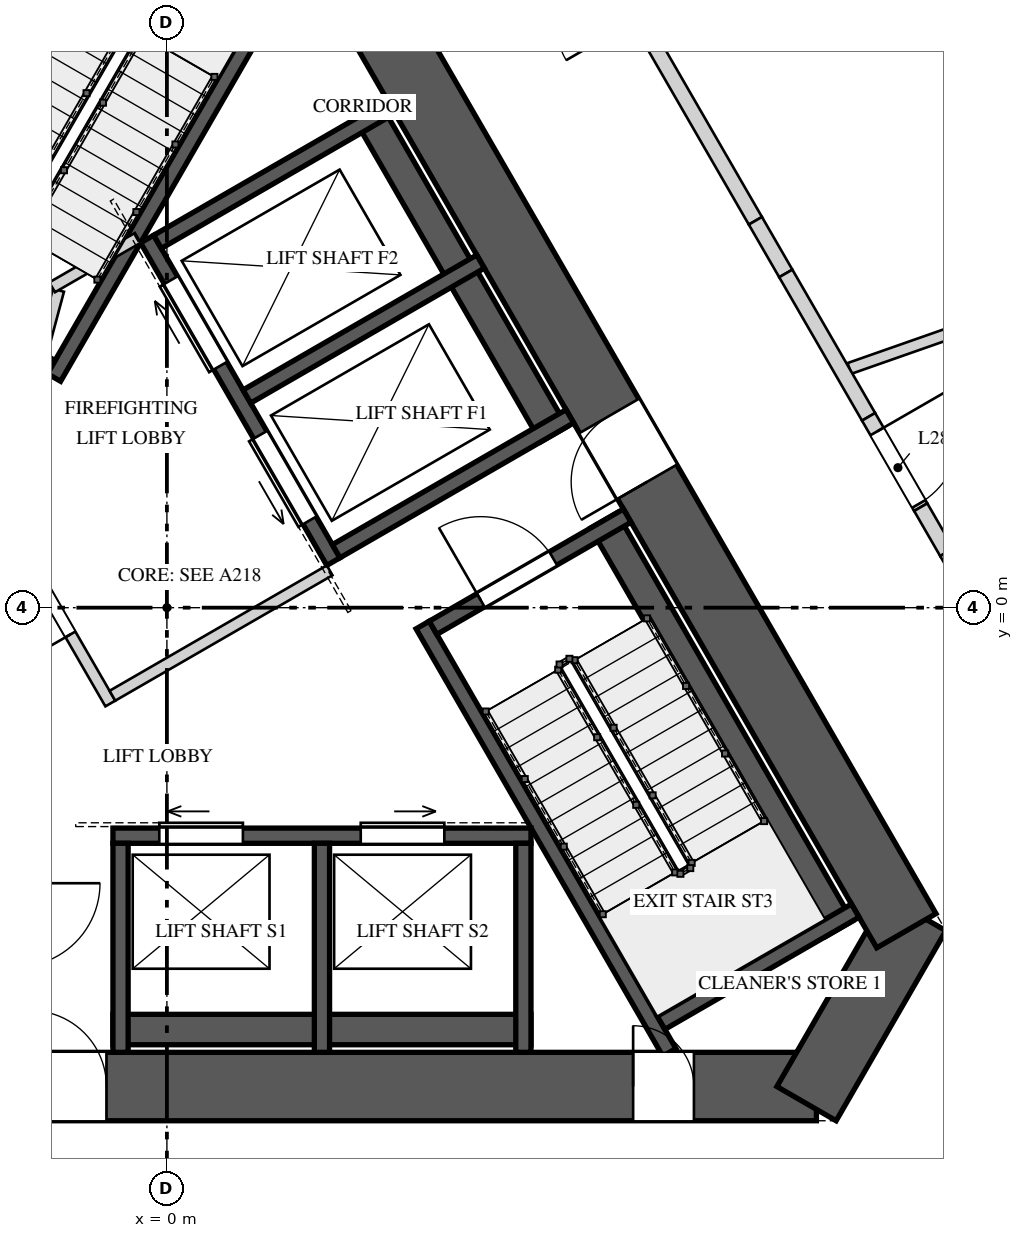
"""IFC4 building model, lengths in metres.
Left out: names, types, materials, properties, quantities, classifications, styles, units other than length and angle.
Written with IfcOpenShell. Run it as: python <this file> out.ifc"""

import sys

from ifc_helpers import new_model, si_unit, direction, frame, frame_2d, origin, place, context, subcontext, project, spatial, polyline, rectangle, outline, extrude, element, fill, save


model = new_model("IFC4")
c1 = context("Model", 3, precision=1e-05, world=origin(), true_north=direction((0.0, 1.0)))
c2 = subcontext(c1, "Body", "Model", "MODEL_VIEW")
j1 = project(units=[si_unit("LENGTHUNIT", "METRE"), si_unit("PLANEANGLEUNIT", "RADIAN")], contexts=[c1])
p1 = place(None, origin())
s1 = spatial("IfcSite", under=j1, at=p1, CompositionType="ELEMENT")
p2 = place(p1, origin())
s2 = spatial("IfcBuilding", under=s1, at=p2, CompositionType="ELEMENT")
p3 = place(p2, frame((0.0, 0.0, 125.6)))
s3 = spatial("IfcBuildingStorey", under=s2, at=p3, CompositionType="ELEMENT", Elevation=125.6)
p4 = place(p3, frame((-1.184, 10.55, 0.0), z_axis=(0.0, 0.0, 1.0), x_axis=(-0.500004814304, -0.866022624227, 0.0)))
e1 = element("IfcWall", 1, at=p4, inside=s3, PredefinedType="SHEAR", context=c2, shape_type="SweptSolid", body=[
    extrude(rectangle(XDim=17.09, YDim=0.9, at=frame_2d((8.545, 0.0))), origin(), (0.0, 0.0, 1.0), 4.0),
])
p5 = place(p4, frame((6.75, 0.0, 0.0)))
e2 = element("IfcOpeningElement", 2, at=p5, cuts=e1, PredefinedType="OPENING", context=c2, shape_type="SweptSolid", body=[
    extrude(rectangle(XDim=1.0, YDim=2.4, at=frame_2d((0.5, 1.2))), frame((0.0, 0.46, 0.0), z_axis=(0.0, -1.0, 0.0), x_axis=(1.0, 0.0, 0.0)), (0.0, 0.0, 1.0), 0.92),
])
p6 = place(p4, frame((14.678, 0.0, 0.0)))
e3 = element("IfcOpeningElement", 3, at=p6, cuts=e1, PredefinedType="OPENING", context=c2, shape_type="SweptSolid", body=[
    extrude(rectangle(XDim=0.8, YDim=2.1, at=frame_2d((0.4, 1.05))), frame((0.0, 0.46, 0.0), z_axis=(0.0, -1.0, 0.0), x_axis=(1.0, 0.0, 0.0)), (0.0, 0.0, 1.0), 0.92),
])
p7 = place(p3, frame((-8.545, -6.3, 0.0), z_axis=(0.0, 0.0, 1.0), x_axis=(1.0, 0.0, 0.0)))
e4 = element("IfcWall", 4, at=p7, inside=s3, PredefinedType="SHEAR", context=c2, shape_type="SweptSolid", body=[
    extrude(rectangle(XDim=17.09, YDim=0.9, at=frame_2d((8.545, 0.0))), origin(), (0.0, 0.0, 1.0), 4.0),
])
p8 = place(p7, frame((6.75, 0.0, 0.0)))
e5 = element("IfcOpeningElement", 5, at=p8, cuts=e4, PredefinedType="OPENING", context=c2, shape_type="SweptSolid", body=[
    extrude(rectangle(XDim=1.0, YDim=2.4, at=frame_2d((0.5, 1.2))), frame((0.0, 0.46, 0.0), z_axis=(0.0, -1.0, 0.0), x_axis=(1.0, 0.0, 0.0)), (0.0, 0.0, 1.0), 0.92),
])
p9 = place(p7, frame((14.678, 0.0, 0.0)))
e6 = element("IfcOpeningElement", 6, at=p9, cuts=e4, PredefinedType="OPENING", context=c2, shape_type="SweptSolid", body=[
    extrude(rectangle(XDim=0.8, YDim=2.1, at=frame_2d((0.4, 1.05))), frame((0.0, 0.46, 0.0), z_axis=(0.0, -1.0, 0.0), x_axis=(1.0, 0.0, 0.0)), (0.0, 0.0, 1.0), 0.92),
])
p10 = place(p3, frame((8.415, -6.525, 0.0), z_axis=(0.0, 0.0, 1.0), x_axis=(0.500059191753, 0.865991226713, 0.0)))
e7 = element("IfcWall", 7, at=p10, inside=s3, PredefinedType="SHEAR", context=c2, shape_type="SweptSolid", body=[
    extrude(rectangle(XDim=2.887, YDim=0.9, at=frame_2d((1.443, 0.0))), origin(), (0.0, 0.0, 1.0), 4.0),
])
p11 = place(p3, frame((9.729, -4.25, 0.0), z_axis=(0.0, 0.0, 1.0), x_axis=(-0.500004814304, 0.866022624227, 0.0)))
e8 = element("IfcWall", 8, at=p11, inside=s3, PredefinedType="SHEAR", context=c2, shape_type="SweptSolid", body=[
    extrude(rectangle(XDim=17.09, YDim=0.9, at=frame_2d((8.545, 0.0))), origin(), (0.0, 0.0, 1.0), 4.0),
])
p12 = place(p11, frame((6.82, 0.0, 0.0)))
e9 = element("IfcOpeningElement", 9, at=p12, cuts=e8, PredefinedType="OPENING", context=c2, shape_type="SweptSolid", body=[
    extrude(rectangle(XDim=1.0, YDim=2.4, at=frame_2d((0.5, 1.2))), frame((0.0, 0.46, 0.0), z_axis=(0.0, -1.0, 0.0), x_axis=(1.0, 0.0, 0.0)), (0.0, 0.0, 1.0), 0.92),
])
p13 = place(p3, frame((-0.766, 9.772, 0.0), z_axis=(0.0, 0.0, 1.0), x_axis=(-0.500009909098, -0.866019682689, 0.0)))
e10 = element("IfcWall", 10, at=p13, inside=s3, PredefinedType="SOLIDWALL", context=c2, shape_type="SweptSolid", body=[
    extrude(rectangle(XDim=6.2, YDim=0.4, at=frame_2d((3.1, 0.0))), origin(), (0.0, 0.0, 1.0), 3.65),
])
p14 = place(p3, frame((1.761, 8.65, 0.0), z_axis=(0.0, 0.0, 1.0), x_axis=(-0.500010023241, -0.866019616786, 0.0)))
e11 = element("IfcWall", 11, at=p14, inside=s3, PredefinedType="SOLIDWALL", context=c2, shape_type="SweptSolid", body=[
    extrude(rectangle(XDim=6.491, YDim=0.2, at=frame_2d((3.246, 0.0))), origin(), (0.0, 0.0, 1.0), 3.65),
])
p15 = place(p3, frame((-1.521, 3.165, 0.0), z_axis=(0.0, 0.0, 1.0), x_axis=(-0.866039495442, 0.49997559174, 0.0)))
e12 = element("IfcWall", 12, at=p15, inside=s3, PredefinedType="SOLIDWALL", context=c2, shape_type="SweptSolid", body=[
    extrude(rectangle(XDim=2.95, YDim=0.2, at=frame_2d((1.475, 0.0))), origin(), (0.0, 0.0, 1.0), 3.65),
])
p16 = place(p15, frame((0.725, 0.0, 0.0)))
e13 = element("IfcOpeningElement", 13, at=p16, cuts=e12, PredefinedType="OPENING", context=c2, shape_type="SweptSolid", body=[
    extrude(rectangle(XDim=1.1, YDim=2.4, at=frame_2d((0.55, 1.2))), frame((0.0, 0.11, 0.0), z_axis=(0.0, -1.0, 0.0), x_axis=(1.0, 0.0, 0.0)), (0.0, 0.0, 1.0), 0.22),
])
p17 = place(p3, frame((8.846, -4.222, 0.0), z_axis=(0.0, 0.0, 1.0), x_axis=(-0.500009909098, 0.866019682689, 0.0)))
e14 = element("IfcWall", 14, at=p17, inside=s3, PredefinedType="SOLIDWALL", context=c2, shape_type="SweptSolid", body=[
    extrude(rectangle(XDim=6.2, YDim=0.4, at=frame_2d((3.1, 0.0))), origin(), (0.0, 0.0, 1.0), 3.65),
])
p18 = place(p3, frame((6.611, -5.85, 0.0), z_axis=(0.0, 0.0, 1.0), x_axis=(-0.499965531574, 0.866045303225, 0.0)))
e15 = element("IfcWall", 15, at=p18, inside=s3, PredefinedType="SOLIDWALL", context=c2, shape_type="SweptSolid", body=[
    extrude(rectangle(XDim=6.492, YDim=0.2, at=frame_2d((3.246, 0.0))), origin(), (0.0, 0.0, 1.0), 3.65),
])
p19 = place(p3, frame((6.501, -5.461, 0.0), z_axis=(0.0, 0.0, 1.0), x_axis=(0.866003658127, 0.500037662692, 0.0)))
e16 = element("IfcWall", 16, at=p19, inside=s3, PredefinedType="SOLIDWALL", context=c2, shape_type="SweptSolid", body=[
    extrude(rectangle(XDim=2.95, YDim=0.2, at=frame_2d((1.475, 0.0))), origin(), (0.0, 0.0, 1.0), 3.65),
])
p20 = place(p3, frame((3.501, -0.265, 0.0), z_axis=(0.0, 0.0, 1.0), x_axis=(0.866039495442, 0.49997559174, 0.0)))
e17 = element("IfcWall", 17, at=p20, inside=s3, PredefinedType="SOLIDWALL", context=c2, shape_type="SweptSolid", body=[
    extrude(rectangle(XDim=2.95, YDim=0.2, at=frame_2d((1.475, 0.0))), origin(), (0.0, 0.0, 1.0), 3.65),
])
p21 = place(p20, frame((0.725, 0.0, 0.0)))
e18 = element("IfcOpeningElement", 18, at=p21, cuts=e17, PredefinedType="OPENING", context=c2, shape_type="SweptSolid", body=[
    extrude(rectangle(XDim=1.1, YDim=2.4, at=frame_2d((0.55, 1.2))), frame((0.0, 0.11, 0.0), z_axis=(0.0, -1.0, 0.0), x_axis=(1.0, 0.0, 0.0)), (0.0, 0.0, 1.0), 0.22),
])
p22 = place(p3, frame((-0.71, -3.0, 0.0), z_axis=(0.0, 0.0, 1.0), x_axis=(1.0, 0.0, 0.0)))
e19 = element("IfcWall", 19, at=p22, inside=s3, PredefinedType="SOLIDWALL", context=c2, shape_type="SweptSolid", body=[
    extrude(rectangle(XDim=5.5, YDim=0.2, at=frame_2d((2.75, 0.0))), origin(), (0.0, 0.0, 1.0), 3.65),
])
p23 = place(p22, frame((0.61, 0.0, 0.0)))
e20 = element("IfcOpeningElement", 20, at=p23, cuts=e19, PredefinedType="OPENING", context=c2, shape_type="SweptSolid", body=[
    extrude(rectangle(XDim=1.1, YDim=2.1, at=frame_2d((0.55, 1.05))), frame((0.0, 0.11, 0.0), z_axis=(0.0, -1.0, 0.0), x_axis=(1.0, 0.0, 0.0)), (0.0, 0.0, 1.0), 0.22),
])
p24 = place(p22, frame((3.26, 0.0, 0.0)))
e21 = element("IfcOpeningElement", 21, at=p24, cuts=e19, PredefinedType="OPENING", context=c2, shape_type="SweptSolid", body=[
    extrude(rectangle(XDim=1.1, YDim=2.1, at=frame_2d((0.55, 1.05))), frame((0.0, 0.11, 0.0), z_axis=(0.0, -1.0, 0.0), x_axis=(1.0, 0.0, 0.0)), (0.0, 0.0, 1.0), 0.22),
])
p25 = place(p3, frame((-0.71, -5.55, 0.0), z_axis=(0.0, 0.0, 1.0), x_axis=(1.0, 0.0, 0.0)))
e22 = element("IfcWall", 22, at=p25, inside=s3, PredefinedType="SOLIDWALL", context=c2, shape_type="SweptSolid", body=[
    extrude(rectangle(XDim=5.5, YDim=0.4, at=frame_2d((2.75, 0.0))), origin(), (0.0, 0.0, 1.0), 3.65),
])
for number, where, z_axis, x_axis in (
    (23, (-0.61, -3.1, 0.0), (0.0, 0.0, 1.0), (0.0, -1.0, 0.0)),
    (24, (2.04, -3.1, 0.0), (0.0, 0.0, 1.0), (0.0, -1.0, 0.0)),
    (25, (4.69, -3.1, 0.0), (0.0, 0.0, 1.0), (0.0, -1.0, 0.0)),
):
    element("IfcWall", number, at=place(p3, frame(where, z_axis=z_axis, x_axis=x_axis)), inside=s3, PredefinedType="SOLIDWALL", context=c2, shape_type="SweptSolid", body=[
        extrude(rectangle(XDim=2.75, YDim=0.2, at=frame_2d((1.375, 0.0))), origin(), (0.0, 0.0, 1.0), 3.65),
    ])
p26 = place(p3, frame((2.19, 0.606, 0.0), z_axis=(0.0, 0.0, 1.0), x_axis=(-0.500002801628, 0.866023786258, 0.0)))
e26 = element("IfcWall", 26, at=p26, inside=s3, PredefinedType="SOLIDWALL", context=c2, shape_type="SweptSolid", body=[
    extrude(rectangle(XDim=4.9, YDim=0.2, at=frame_2d((2.45, 0.0))), origin(), (0.0, 0.0, 1.0), 3.65),
])
p27 = place(p26, frame((0.625, 0.0, 0.0)))
e27 = element("IfcOpeningElement", 27, at=p27, cuts=e26, PredefinedType="OPENING", context=c2, shape_type="SweptSolid", body=[
    extrude(rectangle(XDim=1.3, YDim=2.1, at=frame_2d((0.65, 1.05))), frame((0.0, 0.11, 0.0), z_axis=(0.0, -1.0, 0.0), x_axis=(1.0, 0.0, 0.0)), (0.0, 0.0, 1.0), 0.22),
])
p28 = place(p26, frame((2.975, 0.0, 0.0)))
e28 = element("IfcOpeningElement", 28, at=p28, cuts=e26, PredefinedType="OPENING", context=c2, shape_type="SweptSolid", body=[
    extrude(rectangle(XDim=1.3, YDim=2.1, at=frame_2d((0.65, 1.05))), frame((0.0, 0.11, 0.0), z_axis=(0.0, -1.0, 0.0), x_axis=(1.0, 0.0, 0.0)), (0.0, 0.0, 1.0), 0.22),
])
p29 = place(p3, frame((5.092, 2.281, 0.0), z_axis=(0.0, 0.0, 1.0), x_axis=(-0.500018594424, 0.866014668023, 0.0)))
e29 = element("IfcWall", 29, at=p29, inside=s3, PredefinedType="SOLIDWALL", context=c2, shape_type="SweptSolid", body=[
    extrude(rectangle(XDim=4.9, YDim=0.4, at=frame_2d((2.45, 0.0))), origin(), (0.0, 0.0, 1.0), 3.65),
])
for number, where, z_axis, x_axis in (
    (30, (2.227, 0.743, 0.0), (0.0, 0.0, 1.0), (0.866, 0.5, 0.0)),
    (31, (1.052, 2.778, 0.0), (0.0, 0.0, 1.0), (0.866, 0.5, 0.0)),
):
    element("IfcWall", number, at=place(p3, frame(where, z_axis=z_axis, x_axis=x_axis)), inside=s3, PredefinedType="SOLIDWALL", context=c2, shape_type="SweptSolid", body=[
        extrude(rectangle(XDim=3.55, YDim=0.2, at=frame_2d((1.775, 0.0))), origin(), (0.0, 0.0, 1.0), 3.65),
    ])
p30 = place(p3, frame((-0.123, 4.813, 0.0), z_axis=(0.0, 0.0, 1.0), x_axis=(0.865995461329, 0.500051858269, 0.0)))
e32 = element("IfcWall", 32, at=p30, inside=s3, PredefinedType="SOLIDWALL", context=c2, shape_type="SweptSolid", body=[
    extrude(rectangle(XDim=3.55, YDim=0.2, at=frame_2d((1.775, 0.0))), origin(), (0.0, 0.0, 1.0), 3.65),
])
p31 = place(p3, frame((-0.744, -1.261, 0.0), z_axis=(0.0, 0.0, 1.0), x_axis=(-0.500004234368, 0.866022959057, 0.0)))
e33 = element("IfcWall", 33, at=p31, inside=s3, PredefinedType="PARTITIONING", context=c2, shape_type="SweptSolid", body=[
    extrude(rectangle(XDim=3.125, YDim=0.15, at=frame_2d((1.562, 0.0))), origin(), (0.0, 0.0, 1.0), 3.65),
])
p32 = place(p31, frame((1.05, 0.0, 0.0)))
e34 = element("IfcOpeningElement", 34, at=p32, cuts=e33, PredefinedType="OPENING", context=c2, shape_type="SweptSolid", body=[
    extrude(rectangle(XDim=1.1, YDim=2.4, at=frame_2d((0.55, 1.2))), frame((0.0, 0.085, 0.0), z_axis=(0.0, -1.0, 0.0), x_axis=(1.0, 0.0, 0.0)), (0.0, 0.0, 1.0), 0.17),
])
p33 = place(p3, frame((-0.717, -1.159, 0.0), z_axis=(0.0, 0.0, 1.0), x_axis=(0.866008176907, 0.50002983664, 0.0)))
e35 = element("IfcWall", 35, at=p33, inside=s3, PredefinedType="PARTITIONING", context=c2, shape_type="SweptSolid", body=[
    extrude(rectangle(XDim=3.3, YDim=0.15, at=frame_2d((1.65, 0.0))), origin(), (0.0, 0.0, 1.0), 3.65),
])
p34 = place(p3, frame((-2.178, 1.372, 0.0), z_axis=(0.0, 0.0, 1.0), x_axis=(0.258808958833, 0.96592852884, 0.0)))
e36 = element("IfcWall", 36, at=p34, inside=s3, PredefinedType="PARTITIONING", context=c2, shape_type="SweptSolid", body=[
    extrude(rectangle(XDim=2.903, YDim=0.15, at=frame_2d((1.451, 0.0))), origin(), (0.0, 0.0, 1.0), 3.65),
])
p35 = place(p3, frame((-1.51, 4.215, 0.0), z_axis=(0.0, 0.0, 1.0), x_axis=(0.866085525409, 0.49989585183, 0.0)))
e37 = element("IfcWall", 37, at=p35, inside=s3, PredefinedType="PARTITIONING", context=c2, shape_type="SweptSolid", body=[
    extrude(rectangle(XDim=1.3, YDim=0.15, at=frame_2d((0.65, 0.0))), origin(), (0.0, 0.0, 1.0), 3.65),
])
p36 = place(p3, frame((17.545, 6.149, 0.0), z_axis=(0.0, 0.0, 1.0), x_axis=(-0.943716534822, -0.33075535053, 0.0)))
e38 = element("IfcWall", 38, at=p36, inside=s3, PredefinedType="PARTITIONING", context=c2, shape_type="SweptSolid", body=[
    extrude(rectangle(XDim=9.077, YDim=0.15, at=frame_2d((4.539, 0.0))), origin(), (0.0, 0.0, 1.0), 3.65),
])
p37 = place(p3, frame((6.23, 7.709, 0.0), z_axis=(0.0, 0.0, 1.0), x_axis=(0.499985689571, -0.866033665757, 0.0)))
e39 = element("IfcWall", 39, at=p37, inside=s3, PredefinedType="SOLIDWALL", context=c2, shape_type="SweptSolid", body=[
    extrude(rectangle(XDim=3.024, YDim=0.2, at=frame_2d((1.512, 0.0))), origin(), (0.0, 0.0, 1.0), 3.65),
])
p38 = place(p3, frame((7.742, 5.09, 0.0), z_axis=(0.0, 0.0, 1.0), x_axis=(0.500109828528, -0.865961984968, 0.0)))
e40 = element("IfcWall", 40, at=p38, inside=s3, PredefinedType="SOLIDWALL", context=c2, shape_type="SweptSolid", body=[
    extrude(rectangle(XDim=0.8, YDim=0.2, at=frame_2d((0.4, 0.0))), origin(), (0.0, 0.0, 1.0), 2.75),
])
p39 = place(p3, frame((8.142, 4.397, 0.0), z_axis=(0.0, 0.0, 1.0), x_axis=(0.499948868167, -0.866054922749, 0.0)))
e41 = element("IfcWall", 41, at=p39, inside=s3, PredefinedType="SOLIDWALL", context=c2, shape_type="SweptSolid", body=[
    extrude(rectangle(XDim=2.178, YDim=0.2, at=frame_2d((1.089, 0.0))), origin(), (0.0, 0.0, 1.0), 3.65),
])
p40 = place(p3, frame((9.231, 2.511, 0.0), z_axis=(0.0, 0.0, 1.0), x_axis=(0.49998419723, -0.866034527326, 0.0)))
e42 = element("IfcWall", 42, at=p40, inside=s3, PredefinedType="SOLIDWALL", context=c2, shape_type="SweptSolid", body=[
    extrude(outline(polyline([(0.0, 0.0), (1.373, 0.0), (1.373, 3.65), (0.944, 3.65), (0.944, 2.55), (0.0, 2.55), (0.0, 0.0)])), frame((0.0, 0.1, 0.0), z_axis=(0.0, -1.0, 0.0), x_axis=(1.0, 0.0, 0.0)), (0.0, 0.0, 1.0), 0.2),
])
p41 = place(p40, frame((0.223, 0.0, 0.0)))
e43 = element("IfcOpeningElement", 43, at=p41, cuts=e42, PredefinedType="OPENING", context=c2, shape_type="SweptSolid", body=[
    extrude(rectangle(XDim=1.1, YDim=2.4, at=frame_2d((0.55, 1.2))), frame((0.0, 0.11, 0.0), z_axis=(0.0, -1.0, 0.0), x_axis=(1.0, 0.0, 0.0)), (0.0, 0.0, 1.0), 0.22),
])
p42 = place(p3, frame((9.917, 1.322, 0.0), z_axis=(0.0, 0.0, 1.0), x_axis=(0.500010383074, -0.866019409031, 0.0)))
e44 = element("IfcWall", 44, at=p42, inside=s3, PredefinedType="SOLIDWALL", context=c2, shape_type="SweptSolid", body=[
    extrude(rectangle(XDim=0.685, YDim=0.2, at=frame_2d((0.343, 0.0))), origin(), (0.0, 0.0, 1.0), 3.65),
])
p43 = place(p3, frame((10.26, 0.729, 0.0), z_axis=(0.0, 0.0, 1.0), x_axis=(0.499935808259, -0.866062461731, 0.0)))
e45 = element("IfcWall", 45, at=p43, inside=s3, PredefinedType="SOLIDWALL", context=c2, shape_type="SweptSolid", body=[
    extrude(rectangle(XDim=1.024, YDim=0.2, at=frame_2d((0.512, 0.0))), origin(), (0.0, 0.0, 1.0), 2.55),
])
p44 = place(p21, origin())
e46 = element("IfcDoor", 46, at=p44, inside=s3, OperationType="SINGLE_SWING_RIGHT", PredefinedType="DOOR", context=c2, shape_type="SweptSolid", body=[
    extrude(rectangle(XDim=1.1, YDim=2.4, at=frame_2d((0.55, 1.2))), frame((0.0, 0.025, 0.0), z_axis=(0.0, -1.0, 0.0), x_axis=(1.0, 0.0, 0.0)), (0.0, 0.0, 1.0), 0.05),
])
fill(e18, e46)
p45 = place(p23, origin())
e47 = element("IfcDoor", 47, at=p45, inside=s3, OperationType="SLIDING_TO_LEFT", PredefinedType="DOOR", context=c2, shape_type="SweptSolid", body=[
    extrude(rectangle(XDim=1.1, YDim=2.1, at=frame_2d((0.55, 1.05))), frame((0.0, 0.025, 0.0), z_axis=(0.0, -1.0, 0.0), x_axis=(1.0, 0.0, 0.0)), (0.0, 0.0, 1.0), 0.05),
])
fill(e20, e47)
p46 = place(p24, origin())
e48 = element("IfcDoor", 48, at=p46, inside=s3, OperationType="SLIDING_TO_RIGHT", PredefinedType="DOOR", context=c2, shape_type="SweptSolid", body=[
    extrude(rectangle(XDim=1.1, YDim=2.1, at=frame_2d((0.55, 1.05))), frame((0.0, 0.025, 0.0), z_axis=(0.0, -1.0, 0.0), x_axis=(1.0, 0.0, 0.0)), (0.0, 0.0, 1.0), 0.05),
])
fill(e21, e48)
p47 = place(p27, origin())
e49 = element("IfcDoor", 49, at=p47, inside=s3, OperationType="SLIDING_TO_LEFT", PredefinedType="DOOR", context=c2, shape_type="SweptSolid", body=[
    extrude(rectangle(XDim=1.3, YDim=2.1, at=frame_2d((0.65, 1.05))), frame((0.0, 0.025, 0.0), z_axis=(0.0, -1.0, 0.0), x_axis=(1.0, 0.0, 0.0)), (0.0, 0.0, 1.0), 0.05),
])
fill(e27, e49)
p48 = place(p28, origin())
e50 = element("IfcDoor", 50, at=p48, inside=s3, OperationType="SLIDING_TO_RIGHT", PredefinedType="DOOR", context=c2, shape_type="SweptSolid", body=[
    extrude(rectangle(XDim=1.3, YDim=2.1, at=frame_2d((0.65, 1.05))), frame((0.0, 0.025, 0.0), z_axis=(0.0, -1.0, 0.0), x_axis=(1.0, 0.0, 0.0)), (0.0, 0.0, 1.0), 0.05),
])
fill(e28, e50)
p49 = place(p32, origin())
e51 = element("IfcDoor", 51, at=p49, inside=s3, OperationType="SINGLE_SWING_LEFT", PredefinedType="DOOR", context=c2, shape_type="SweptSolid", body=[
    extrude(rectangle(XDim=1.1, YDim=2.4, at=frame_2d((0.55, 1.2))), frame((0.0, 0.025, 0.0), z_axis=(0.0, -1.0, 0.0), x_axis=(1.0, 0.0, 0.0)), (0.0, 0.0, 1.0), 0.05),
])
fill(e34, e51)
p50 = place(p8, origin())
e52 = element("IfcDoor", 52, at=p50, inside=s3, OperationType="SINGLE_SWING_LEFT", PredefinedType="DOOR", context=c2, shape_type="SweptSolid", body=[
    extrude(rectangle(XDim=1.0, YDim=2.4, at=frame_2d((0.5, 1.2))), frame((0.0, 0.025, 0.0), z_axis=(0.0, -1.0, 0.0), x_axis=(1.0, 0.0, 0.0)), (0.0, 0.0, 1.0), 0.05),
])
fill(e5, e52)
p51 = place(p12, origin())
e53 = element("IfcDoor", 53, at=p51, inside=s3, OperationType="SINGLE_SWING_RIGHT", PredefinedType="DOOR", context=c2, shape_type="SweptSolid", body=[
    extrude(rectangle(XDim=1.0, YDim=2.4, at=frame_2d((0.5, 1.2))), frame((0.0, 0.025, 0.0), z_axis=(0.0, -1.0, 0.0), x_axis=(1.0, 0.0, 0.0)), (0.0, 0.0, 1.0), 0.05),
])
fill(e9, e53)
p52 = place(p9, origin())
e54 = element("IfcDoor", 54, at=p52, inside=s3, OperationType="SINGLE_SWING_RIGHT", PredefinedType="DOOR", context=c2, shape_type="SweptSolid", body=[
    extrude(rectangle(XDim=0.8, YDim=2.1, at=frame_2d((0.4, 1.05))), frame((0.0, 0.025, 0.0), z_axis=(0.0, -1.0, 0.0), x_axis=(1.0, 0.0, 0.0)), (0.0, 0.0, 1.0), 0.05),
])
fill(e6, e54)
p53 = place(p41, origin())
e55 = element("IfcDoor", 55, at=p53, inside=s3, OperationType="SINGLE_SWING_LEFT", PredefinedType="DOOR", context=c2, shape_type="SweptSolid", body=[
    extrude(rectangle(XDim=1.1, YDim=2.4, at=frame_2d((0.55, 1.2))), frame((0.0, 0.025, 0.0), z_axis=(0.0, -1.0, 0.0), x_axis=(1.0, 0.0, 0.0)), (0.0, 0.0, 1.0), 0.05),
])
fill(e43, e55)
save(model, sys.argv[1])
